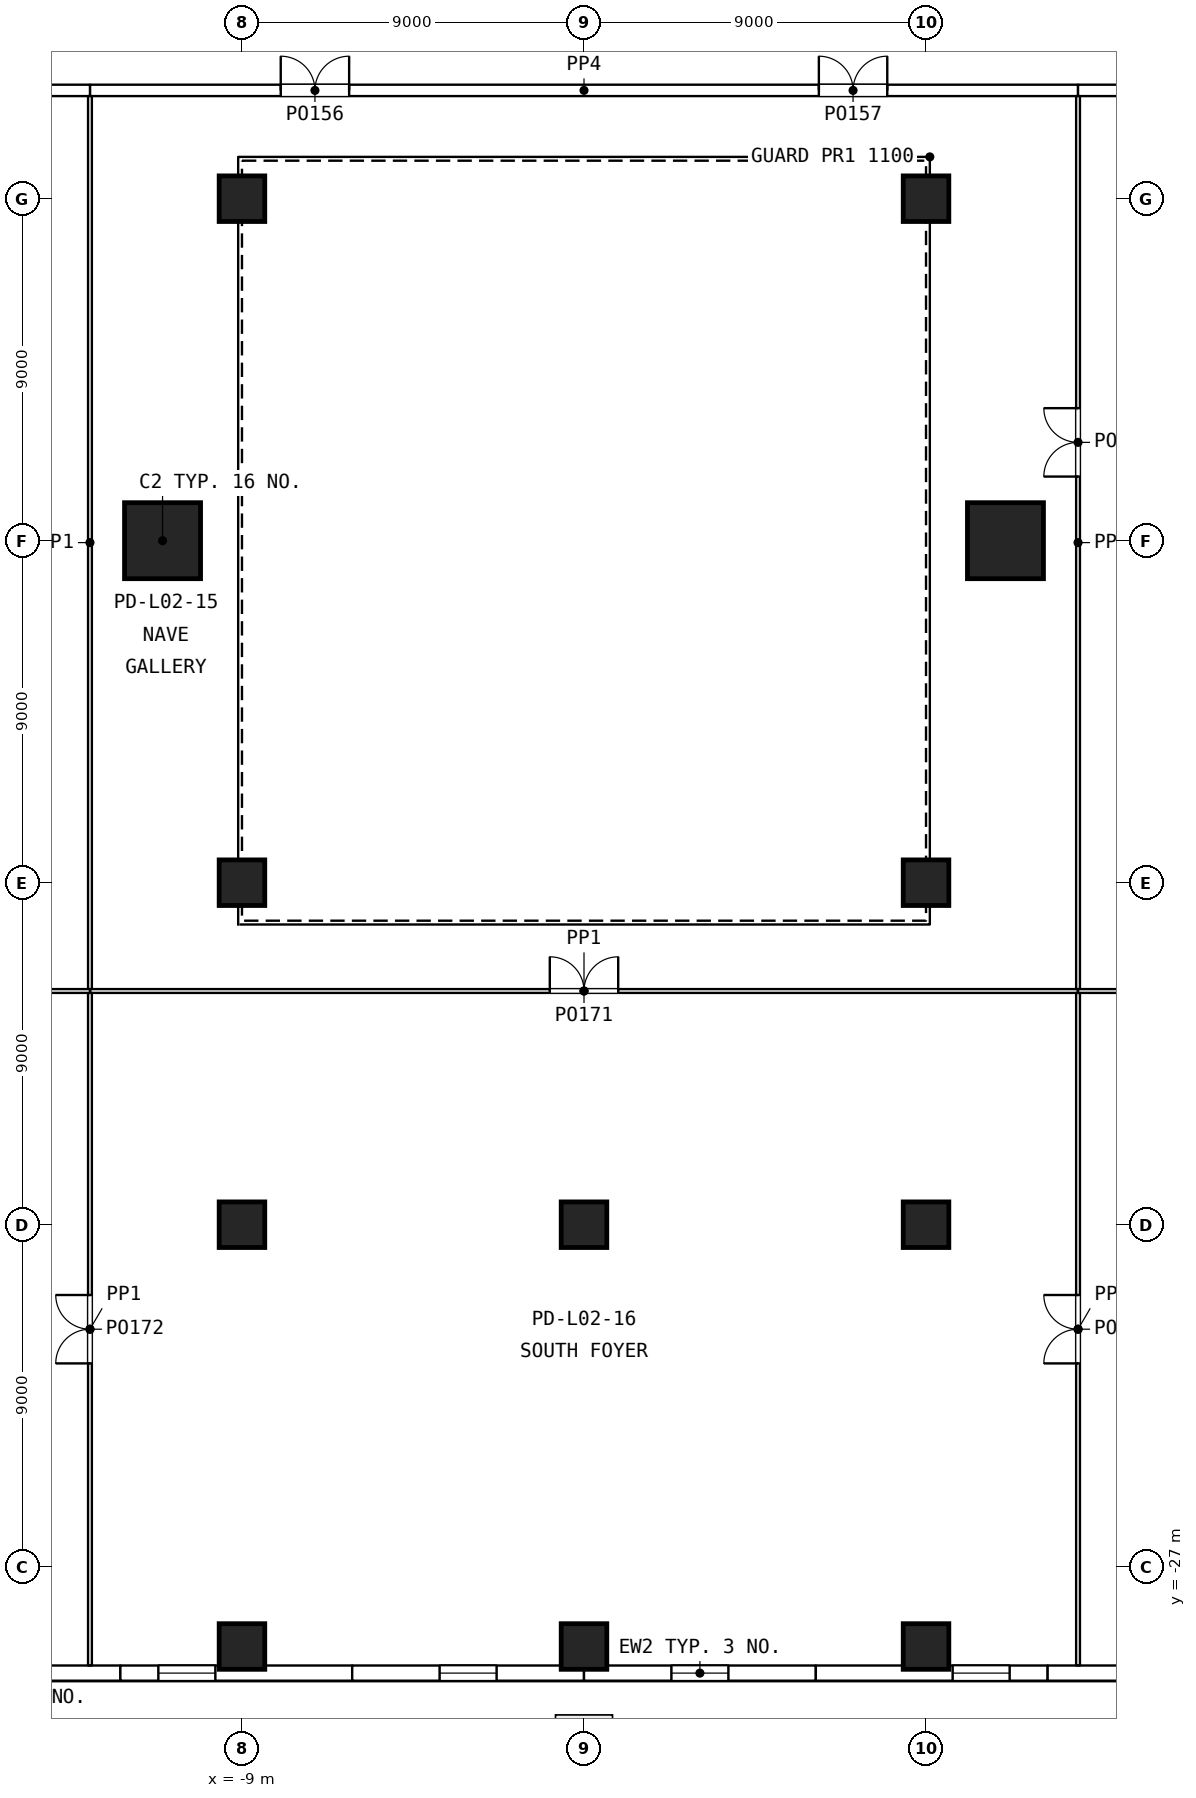
"""IFC4 building model, lengths in metres.
Left out: names, types, materials, properties, quantities, classifications, styles, units other than length and angle.
Written with IfcOpenShell. Run it as: python <this file> out.ifc"""

import sys

from ifc_helpers import new_model, si_unit, direction, frame, frame_2d, origin, origin_2d, place, context, subcontext, project, spatial, rectangle, extrude, element, fill, save


model = new_model("IFC4")
c1 = context("Model", 3, precision=1e-05, world=origin(), true_north=direction((0.0, 1.0)))
c2 = subcontext(c1, "Body", "Model", "MODEL_VIEW")
j1 = project(units=[si_unit("LENGTHUNIT", "METRE"), si_unit("PLANEANGLEUNIT", "RADIAN")], contexts=[c1])
p1 = place(None, origin())
s1 = spatial("IfcSite", under=j1, at=p1, CompositionType="ELEMENT")
p2 = place(p1, origin())
s2 = spatial("IfcBuilding", under=s1, at=p2, CompositionType="ELEMENT")
p3 = place(p2, frame((0.0, 0.0, 12.6)))
s3 = spatial("IfcBuildingStorey", under=s2, at=p3, CompositionType="ELEMENT", Elevation=12.6)
for number, where, z_axis, x_axis in (
    (1, (-9.0, -29.1, 0.0), (0.0, 0.0, 1.0), (1.0, 0.0, 0.0)),
    (2, (-9.0, -18.0, 0.0), (0.0, 0.0, 1.0), (1.0, 0.0, 0.0)),
    (3, (-9.0, -9.0, 0.0), (0.0, 0.0, 1.0), (1.0, 0.0, 0.0)),
    (4, (-9.0, 9.0, 0.0), (0.0, 0.0, 1.0), (1.0, 0.0, 0.0)),
    (5, (0.0, -29.1, 0.0), (0.0, 0.0, 1.0), (1.0, 0.0, 0.0)),
    (6, (0.0, -18.0, 0.0), (0.0, 0.0, 1.0), (1.0, 0.0, 0.0)),
    (7, (9.0, -29.1, 0.0), (0.0, 0.0, 1.0), (1.0, 0.0, 0.0)),
    (8, (9.0, -18.0, 0.0), (0.0, 0.0, 1.0), (1.0, 0.0, 0.0)),
    (9, (9.0, -9.0, 0.0), (0.0, 0.0, 1.0), (1.0, 0.0, 0.0)),
    (10, (9.0, 9.0, 0.0), (0.0, 0.0, 1.0), (1.0, 0.0, 0.0)),
):
    element("IfcColumn", number, at=place(p3, frame(where, z_axis=z_axis, x_axis=x_axis)), inside=s3, PredefinedType="COLUMN", context=c2, shape_type="SweptSolid", body=[
        extrude(rectangle(XDim=1.2, YDim=1.2, at=origin_2d()), origin(), (0.0, 0.0, 1.0), 5.4),
    ])
for number, where, z_axis, x_axis in (
    (11, (-11.09, 0.0, 0.0), (0.0, 0.0, 1.0), (1.0, 0.0, 0.0)),
    (12, (11.09, 0.0, 0.0), (0.0, 0.0, 1.0), (-1.0, 0.0, 0.0)),
):
    element("IfcColumn", number, at=place(p3, frame(where, z_axis=z_axis, x_axis=x_axis)), inside=s3, PredefinedType="COLUMN", context=c2, shape_type="SweptSolid", body=[
        extrude(rectangle(XDim=2.0, YDim=2.0, at=origin_2d()), origin(), (0.0, 0.0, 1.0), 5.4),
    ])
p4 = place(p3, frame((-18.3, -29.8, 0.0), z_axis=(0.0, 0.0, 1.0), x_axis=(1.0, 0.0, 0.0)))
e13 = element("IfcWall", 13, at=p4, inside=s3, PredefinedType="SOLIDWALL", context=c2, shape_type="SweptSolid", body=[
    extrude(rectangle(XDim=6.1, YDim=0.4, at=frame_2d((3.05, 0.0))), origin(), (0.0, 0.0, 1.0), 5.1),
])
p5 = place(p4, frame((2.3, 0.0, 1.0)))
e14 = element("IfcOpeningElement", 14, at=p5, cuts=e13, PredefinedType="OPENING", context=c2, shape_type="SweptSolid", body=[
    extrude(rectangle(XDim=1.5, YDim=2.4, at=frame_2d((0.75, 1.2))), frame((0.0, 0.21, 0.0), z_axis=(0.0, -1.0, 0.0), x_axis=(1.0, 0.0, 0.0)), (0.0, 0.0, 1.0), 0.42),
])
p6 = place(p3, frame((-12.2, -29.8, 0.0), z_axis=(0.0, 0.0, 1.0), x_axis=(1.0, 0.0, 0.0)))
e15 = element("IfcWall", 15, at=p6, inside=s3, PredefinedType="SOLIDWALL", context=c2, shape_type="SweptSolid", body=[
    extrude(rectangle(XDim=6.1, YDim=0.4, at=frame_2d((3.05, 0.0))), origin(), (0.0, 0.0, 1.0), 5.1),
])
p7 = place(p6, frame((1.0, 0.0, 1.0)))
e16 = element("IfcOpeningElement", 16, at=p7, cuts=e15, PredefinedType="OPENING", context=c2, shape_type="SweptSolid", body=[
    extrude(rectangle(XDim=1.5, YDim=2.4, at=frame_2d((0.75, 1.2))), frame((0.0, 0.21, 0.0), z_axis=(0.0, -1.0, 0.0), x_axis=(1.0, 0.0, 0.0)), (0.0, 0.0, 1.0), 0.42),
])
p8 = place(p3, frame((-6.1, -29.8, 0.0), z_axis=(0.0, 0.0, 1.0), x_axis=(1.0, 0.0, 0.0)))
e17 = element("IfcWall", 17, at=p8, inside=s3, PredefinedType="SOLIDWALL", context=c2, shape_type="SweptSolid", body=[
    extrude(rectangle(XDim=6.1, YDim=0.4, at=frame_2d((3.05, 0.0))), origin(), (0.0, 0.0, 1.0), 5.1),
])
p9 = place(p8, frame((2.3, 0.0, 1.0)))
e18 = element("IfcOpeningElement", 18, at=p9, cuts=e17, PredefinedType="OPENING", context=c2, shape_type="SweptSolid", body=[
    extrude(rectangle(XDim=1.5, YDim=2.4, at=frame_2d((0.75, 1.2))), frame((0.0, 0.21, 0.0), z_axis=(0.0, -1.0, 0.0), x_axis=(1.0, 0.0, 0.0)), (0.0, 0.0, 1.0), 0.42),
])
p10 = place(p3, frame((0.0, -29.8, 0.0), z_axis=(0.0, 0.0, 1.0), x_axis=(1.0, 0.0, 0.0)))
e19 = element("IfcWall", 19, at=p10, inside=s3, PredefinedType="SOLIDWALL", context=c2, shape_type="SweptSolid", body=[
    extrude(rectangle(XDim=6.1, YDim=0.4, at=frame_2d((3.05, 0.0))), origin(), (0.0, 0.0, 1.0), 5.1),
])
p11 = place(p10, frame((2.3, 0.0, 1.0)))
e20 = element("IfcOpeningElement", 20, at=p11, cuts=e19, PredefinedType="OPENING", context=c2, shape_type="SweptSolid", body=[
    extrude(rectangle(XDim=1.5, YDim=2.4, at=frame_2d((0.75, 1.2))), frame((0.0, 0.21, 0.0), z_axis=(0.0, -1.0, 0.0), x_axis=(1.0, 0.0, 0.0)), (0.0, 0.0, 1.0), 0.42),
])
p12 = place(p3, frame((6.1, -29.8, 0.0), z_axis=(0.0, 0.0, 1.0), x_axis=(1.0, 0.0, 0.0)))
e21 = element("IfcWall", 21, at=p12, inside=s3, PredefinedType="SOLIDWALL", context=c2, shape_type="SweptSolid", body=[
    extrude(rectangle(XDim=6.1, YDim=0.4, at=frame_2d((3.05, 0.0))), origin(), (0.0, 0.0, 1.0), 5.1),
])
p13 = place(p12, frame((3.6, 0.0, 1.0)))
e22 = element("IfcOpeningElement", 22, at=p13, cuts=e21, PredefinedType="OPENING", context=c2, shape_type="SweptSolid", body=[
    extrude(rectangle(XDim=1.5, YDim=2.4, at=frame_2d((0.75, 1.2))), frame((0.0, 0.21, 0.0), z_axis=(0.0, -1.0, 0.0), x_axis=(1.0, 0.0, 0.0)), (0.0, 0.0, 1.0), 0.42),
])
p14 = place(p3, frame((12.2, -29.8, 0.0), z_axis=(0.0, 0.0, 1.0), x_axis=(1.0, 0.0, 0.0)))
e23 = element("IfcWall", 23, at=p14, inside=s3, PredefinedType="SOLIDWALL", context=c2, shape_type="SweptSolid", body=[
    extrude(rectangle(XDim=6.1, YDim=0.4, at=frame_2d((3.05, 0.0))), origin(), (0.0, 0.0, 1.0), 5.1),
])
p15 = place(p14, frame((2.3, 0.0, 1.0)))
e24 = element("IfcOpeningElement", 24, at=p15, cuts=e23, PredefinedType="OPENING", context=c2, shape_type="SweptSolid", body=[
    extrude(rectangle(XDim=1.5, YDim=2.4, at=frame_2d((0.75, 1.2))), frame((0.0, 0.21, 0.0), z_axis=(0.0, -1.0, 0.0), x_axis=(1.0, 0.0, 0.0)), (0.0, 0.0, 1.0), 0.42),
])
p16 = place(p3, frame((-13.0, 11.85, 0.0), z_axis=(0.0, 0.0, 1.0), x_axis=(1.0, 0.0, 0.0)))
e25 = element("IfcWall", 25, at=p16, inside=s3, PredefinedType="PARTITIONING", context=c2, shape_type="SweptSolid", body=[
    extrude(rectangle(XDim=26.0, YDim=0.3, at=frame_2d((13.0, 0.0))), origin(), (0.0, 0.0, 1.0), 5.1),
])
p17 = place(p16, frame((5.02, 0.0, 0.0)))
e26 = element("IfcOpeningElement", 26, at=p17, cuts=e25, PredefinedType="OPENING", context=c2, shape_type="SweptSolid", body=[
    extrude(rectangle(XDim=1.8, YDim=2.1, at=frame_2d((0.9, 1.05))), frame((0.0, 0.16, 0.0), z_axis=(0.0, -1.0, 0.0), x_axis=(1.0, 0.0, 0.0)), (0.0, 0.0, 1.0), 0.32),
])
p18 = place(p16, frame((19.18, 0.0, 0.0)))
e27 = element("IfcOpeningElement", 27, at=p18, cuts=e25, PredefinedType="OPENING", context=c2, shape_type="SweptSolid", body=[
    extrude(rectangle(XDim=1.8, YDim=2.1, at=frame_2d((0.9, 1.05))), frame((0.0, 0.16, 0.0), z_axis=(0.0, -1.0, 0.0), x_axis=(1.0, 0.0, 0.0)), (0.0, 0.0, 1.0), 0.32),
])
for number, where, z_axis, x_axis in (
    (28, (-20.15, 11.85, 0.0), (0.0, 0.0, 1.0), (1.0, 0.0, 0.0)),
    (29, (13.0, 11.85, 0.0), (0.0, 0.0, 1.0), (1.0, 0.0, 0.0)),
):
    element("IfcWall", number, at=place(p3, frame(where, z_axis=z_axis, x_axis=x_axis)), inside=s3, PredefinedType="PARTITIONING", context=c2, shape_type="SweptSolid", body=[
        extrude(rectangle(XDim=7.15, YDim=0.3, at=frame_2d((3.575, 0.0))), origin(), (0.0, 0.0, 1.0), 5.1),
    ])
p19 = place(p3, frame((-13.0, -11.85, 0.0), z_axis=(0.0, 0.0, 1.0), x_axis=(1.0, 0.0, 0.0)))
e30 = element("IfcWall", 30, at=p19, inside=s3, PredefinedType="PARTITIONING", context=c2, shape_type="SweptSolid", body=[
    extrude(rectangle(XDim=26.0, YDim=0.1, at=frame_2d((13.0, 0.0))), origin(), (0.0, 0.0, 1.0), 5.1),
])
p20 = place(p19, frame((12.1, 0.0, 0.0)))
e31 = element("IfcOpeningElement", 31, at=p20, cuts=e30, PredefinedType="OPENING", context=c2, shape_type="SweptSolid", body=[
    extrude(rectangle(XDim=1.8, YDim=2.1, at=frame_2d((0.9, 1.05))), frame((0.0, 0.06, 0.0), z_axis=(0.0, -1.0, 0.0), x_axis=(1.0, 0.0, 0.0)), (0.0, 0.0, 1.0), 0.12),
])
p21 = place(p3, frame((-13.0, -11.8, 0.0), z_axis=(0.0, 0.0, 1.0), x_axis=(0.0, 1.0, 0.0)))
e32 = element("IfcWall", 32, at=p21, inside=s3, PredefinedType="PARTITIONING", context=c2, shape_type="SweptSolid", body=[
    extrude(rectangle(XDim=23.5, YDim=0.1, at=frame_2d((11.75, 0.0))), origin(), (0.0, 0.0, 1.0), 5.1),
])
p22 = place(p3, frame((13.0, -11.8, 0.0), z_axis=(0.0, 0.0, 1.0), x_axis=(0.0, 1.0, 0.0)))
e33 = element("IfcWall", 33, at=p22, inside=s3, PredefinedType="PARTITIONING", context=c2, shape_type="SweptSolid", body=[
    extrude(rectangle(XDim=23.5, YDim=0.1, at=frame_2d((11.75, 0.0))), origin(), (0.0, 0.0, 1.0), 5.1),
])
p23 = place(p22, frame((13.488, 0.0, 0.0)))
e34 = element("IfcOpeningElement", 34, at=p23, cuts=e33, PredefinedType="OPENING", context=c2, shape_type="SweptSolid", body=[
    extrude(rectangle(XDim=1.8, YDim=2.1, at=frame_2d((0.9, 1.05))), frame((0.0, 0.06, 0.0), z_axis=(0.0, -1.0, 0.0), x_axis=(1.0, 0.0, 0.0)), (0.0, 0.0, 1.0), 0.12),
])
p24 = place(p3, frame((-13.0, -29.6, 0.0), z_axis=(0.0, 0.0, 1.0), x_axis=(0.0, 1.0, 0.0)))
e35 = element("IfcWall", 35, at=p24, inside=s3, PredefinedType="PARTITIONING", context=c2, shape_type="SweptSolid", body=[
    extrude(rectangle(XDim=17.7, YDim=0.1, at=frame_2d((8.85, 0.0))), origin(), (0.0, 0.0, 1.0), 5.1),
])
p25 = place(p24, frame((7.95, 0.0, 0.0)))
e36 = element("IfcOpeningElement", 36, at=p25, cuts=e35, PredefinedType="OPENING", context=c2, shape_type="SweptSolid", body=[
    extrude(rectangle(XDim=1.8, YDim=2.1, at=frame_2d((0.9, 1.05))), frame((0.0, 0.06, 0.0), z_axis=(0.0, -1.0, 0.0), x_axis=(1.0, 0.0, 0.0)), (0.0, 0.0, 1.0), 0.12),
])
p26 = place(p3, frame((13.0, -29.6, 0.0), z_axis=(0.0, 0.0, 1.0), x_axis=(0.0, 1.0, 0.0)))
e37 = element("IfcWall", 37, at=p26, inside=s3, PredefinedType="PARTITIONING", context=c2, shape_type="SweptSolid", body=[
    extrude(rectangle(XDim=17.7, YDim=0.1, at=frame_2d((8.85, 0.0))), origin(), (0.0, 0.0, 1.0), 5.1),
])
p27 = place(p26, frame((7.95, 0.0, 0.0)))
e38 = element("IfcOpeningElement", 38, at=p27, cuts=e37, PredefinedType="OPENING", context=c2, shape_type="SweptSolid", body=[
    extrude(rectangle(XDim=1.8, YDim=2.1, at=frame_2d((0.9, 1.05))), frame((0.0, 0.06, 0.0), z_axis=(0.0, -1.0, 0.0), x_axis=(1.0, 0.0, 0.0)), (0.0, 0.0, 1.0), 0.12),
])
p28 = place(p3, frame((-66.6, -11.85, 0.0), z_axis=(0.0, 0.0, 1.0), x_axis=(1.0, 0.0, 0.0)))
e39 = element("IfcWall", 39, at=p28, inside=s3, PredefinedType="PARTITIONING", context=c2, shape_type="SweptSolid", body=[
    extrude(rectangle(XDim=53.6, YDim=0.1, at=frame_2d((26.8, 0.0))), origin(), (0.0, 0.0, 1.0), 5.1),
])
p29 = place(p3, frame((13.0, -11.85, 0.0), z_axis=(0.0, 0.0, 1.0), x_axis=(1.0, 0.0, 0.0)))
e40 = element("IfcWall", 40, at=p29, inside=s3, PredefinedType="PARTITIONING", context=c2, shape_type="SweptSolid", body=[
    extrude(rectangle(XDim=21.415, YDim=0.1, at=frame_2d((10.708, 0.0))), origin(), (0.0, 0.0, 1.0), 5.1),
])
p30 = place(p7, origin())
e41 = element("IfcWindow", 41, at=p30, inside=s3, PartitioningType="SINGLE_PANEL", PredefinedType="WINDOW", context=c2, shape_type="SweptSolid", body=[
    extrude(rectangle(XDim=1.5, YDim=2.4, at=frame_2d((0.75, 1.2))), frame((0.0, 0.03, 0.0), z_axis=(0.0, -1.0, 0.0), x_axis=(1.0, 0.0, 0.0)), (0.0, 0.0, 1.0), 0.06),
])
fill(e16, e41)
p31 = place(p9, origin())
e42 = element("IfcWindow", 42, at=p31, inside=s3, PartitioningType="SINGLE_PANEL", PredefinedType="WINDOW", context=c2, shape_type="SweptSolid", body=[
    extrude(rectangle(XDim=1.5, YDim=2.4, at=frame_2d((0.75, 1.2))), frame((0.0, 0.03, 0.0), z_axis=(0.0, -1.0, 0.0), x_axis=(1.0, 0.0, 0.0)), (0.0, 0.0, 1.0), 0.06),
])
fill(e18, e42)
p32 = place(p11, origin())
e43 = element("IfcWindow", 43, at=p32, inside=s3, PartitioningType="SINGLE_PANEL", PredefinedType="WINDOW", context=c2, shape_type="SweptSolid", body=[
    extrude(rectangle(XDim=1.5, YDim=2.4, at=frame_2d((0.75, 1.2))), frame((0.0, 0.03, 0.0), z_axis=(0.0, -1.0, 0.0), x_axis=(1.0, 0.0, 0.0)), (0.0, 0.0, 1.0), 0.06),
])
fill(e20, e43)
p33 = place(p13, origin())
e44 = element("IfcWindow", 44, at=p33, inside=s3, PartitioningType="SINGLE_PANEL", PredefinedType="WINDOW", context=c2, shape_type="SweptSolid", body=[
    extrude(rectangle(XDim=1.5, YDim=2.4, at=frame_2d((0.75, 1.2))), frame((0.0, 0.03, 0.0), z_axis=(0.0, -1.0, 0.0), x_axis=(1.0, 0.0, 0.0)), (0.0, 0.0, 1.0), 0.06),
])
fill(e22, e44)
p34 = place(p17, origin())
e45 = element("IfcDoor", 45, at=p34, inside=s3, OperationType="DOUBLE_DOOR_DOUBLE_SWING", PredefinedType="DOOR", context=c2, shape_type="SweptSolid", body=[
    extrude(rectangle(XDim=1.8, YDim=2.1, at=frame_2d((0.9, 1.05))), frame((0.0, 0.025, 0.0), z_axis=(0.0, -1.0, 0.0), x_axis=(1.0, 0.0, 0.0)), (0.0, 0.0, 1.0), 0.05),
])
fill(e26, e45)
p35 = place(p18, origin())
e46 = element("IfcDoor", 46, at=p35, inside=s3, OperationType="DOUBLE_DOOR_DOUBLE_SWING", PredefinedType="DOOR", context=c2, shape_type="SweptSolid", body=[
    extrude(rectangle(XDim=1.8, YDim=2.1, at=frame_2d((0.9, 1.05))), frame((0.0, 0.025, 0.0), z_axis=(0.0, -1.0, 0.0), x_axis=(1.0, 0.0, 0.0)), (0.0, 0.0, 1.0), 0.05),
])
fill(e27, e46)
p36 = place(p20, origin())
e47 = element("IfcDoor", 47, at=p36, inside=s3, OperationType="DOUBLE_DOOR_DOUBLE_SWING", PredefinedType="DOOR", context=c2, shape_type="SweptSolid", body=[
    extrude(rectangle(XDim=1.8, YDim=2.1, at=frame_2d((0.9, 1.05))), frame((0.0, 0.025, 0.0), z_axis=(0.0, -1.0, 0.0), x_axis=(1.0, 0.0, 0.0)), (0.0, 0.0, 1.0), 0.05),
])
fill(e31, e47)
p37 = place(p25, origin())
e48 = element("IfcDoor", 48, at=p37, inside=s3, OperationType="DOUBLE_DOOR_DOUBLE_SWING", PredefinedType="DOOR", context=c2, shape_type="SweptSolid", body=[
    extrude(rectangle(XDim=1.8, YDim=2.1, at=frame_2d((0.9, 1.05))), frame((0.0, 0.025, 0.0), z_axis=(0.0, -1.0, 0.0), x_axis=(1.0, 0.0, 0.0)), (0.0, 0.0, 1.0), 0.05),
])
fill(e36, e48)
p38 = place(p27, origin())
e49 = element("IfcDoor", 49, at=p38, inside=s3, OperationType="DOUBLE_DOOR_DOUBLE_SWING", PredefinedType="DOOR", context=c2, shape_type="SweptSolid", body=[
    extrude(rectangle(XDim=1.8, YDim=2.1, at=frame_2d((0.9, 1.05))), frame((0.0, 0.025, 0.0), z_axis=(0.0, -1.0, 0.0), x_axis=(1.0, 0.0, 0.0)), (0.0, 0.0, 1.0), 0.05),
])
fill(e38, e49)
p39 = place(p23, origin())
e50 = element("IfcDoor", 50, at=p39, inside=s3, OperationType="DOUBLE_DOOR_DOUBLE_SWING", PredefinedType="DOOR", context=c2, shape_type="SweptSolid", body=[
    extrude(rectangle(XDim=1.8, YDim=2.1, at=frame_2d((0.9, 1.05))), frame((0.0, 0.025, 0.0), z_axis=(0.0, -1.0, 0.0), x_axis=(1.0, 0.0, 0.0)), (0.0, 0.0, 1.0), 0.05),
])
fill(e34, e50)
save(model, sys.argv[1])
